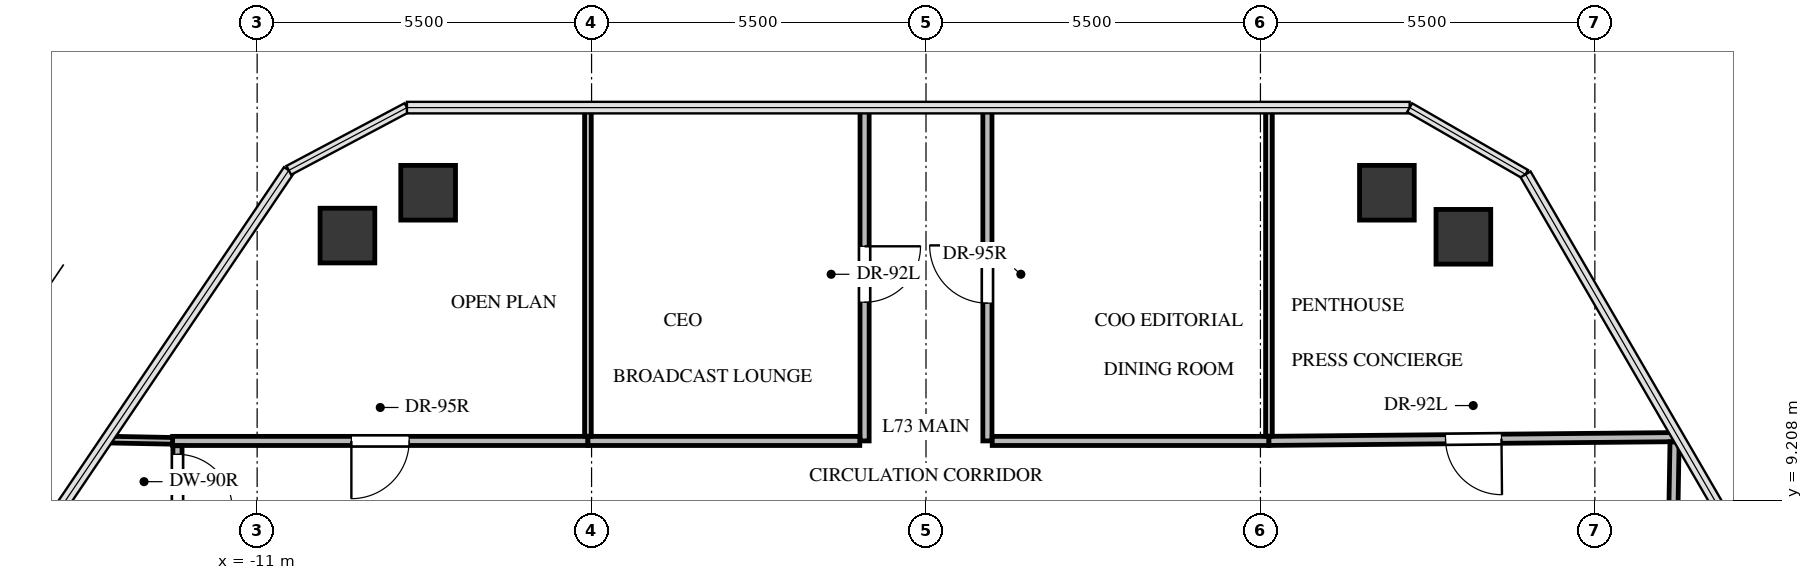
"""IFC4 building model, lengths in metres.
Left out: names, types, materials, properties, quantities, classifications, styles, units other than length and angle.
Written with IfcOpenShell. Run it as: python <this file> out.ifc"""

import sys

from ifc_helpers import new_model, si_unit, direction, frame, frame_2d, origin, origin_2d, place, context, subcontext, project, spatial, rectangle, extrude, source, transform, mapped, element, fill, save


model = new_model("IFC4")
c1 = context("Model", 3, precision=1e-05, world=origin(), true_north=direction((0.0, 1.0)))
c2 = subcontext(c1, "Body", "Model", "MODEL_VIEW")
j1 = project(units=[si_unit("LENGTHUNIT", "METRE"), si_unit("PLANEANGLEUNIT", "RADIAN")], contexts=[c1])
p1 = place(None, origin())
s1 = spatial("IfcSite", under=j1, at=p1, CompositionType="ELEMENT")
p2 = place(p1, origin())
s2 = spatial("IfcBuilding", under=s1, at=p2, CompositionType="ELEMENT")
p3 = place(p2, frame((0.0, 0.0, 261.5)))
s3 = spatial("IfcBuildingStorey", under=s2, at=p3, CompositionType="ELEMENT", Elevation=261.5)
m1 = source(origin(), c2, "Body", "SweptSolid", [
    extrude(rectangle(XDim=0.9, YDim=0.9, at=origin_2d()), origin(), (0.0, 0.0, 1.0), 3.34),
])
for number, where, z_axis, x_axis in (
    (1, (-9.515, 13.557, -0.24), (0.0, 0.0, 1.0), (1.0, 0.0, 0.0)),
    (2, (-8.188, 14.262, -0.24), (0.0, 0.0, 1.0), (1.0, 0.0, 0.0)),
    (3, (7.58, 14.262, -0.24), (0.0, 0.0, 1.0), (1.0, 0.0, 0.0)),
    (4, (8.837, 13.538, -0.24), (0.0, 0.0, 1.0), (1.0, 0.0, 0.0)),
):
    element("IfcColumn", number, at=place(p3, frame(where, z_axis=z_axis, x_axis=x_axis)), inside=s3, PredefinedType="COLUMN", context=c2, shape_type="MappedRepresentation", body=[
        mapped(m1, transform((0.0, 0.0, 0.0), x_axis=(1.0, 0.0, 0.0), y_axis=(0.0, 1.0, 0.0), z_axis=(0.0, 0.0, 1.0), scale=1.0)),
    ])
p4 = place(p3, frame((-5.56, 10.18, 0.0), z_axis=(0.0, 0.0, 1.0), x_axis=(-1.0, 0.0, 0.0)))
e5 = element("IfcWall", 5, at=p4, inside=s3, PredefinedType="PARTITIONING", context=c2, shape_type="SweptSolid", body=[
    extrude(rectangle(XDim=6.83, YDim=0.15, at=frame_2d((3.415, 0.0))), origin(), (0.0, 0.0, 1.0), 2.341),
])
p5 = place(p4, frame((2.94, 0.0, 0.0)))
e6 = element("IfcOpeningElement", 6, at=p5, cuts=e5, PredefinedType="OPENING", context=c2, shape_type="SweptSolid", body=[
    extrude(rectangle(XDim=0.95, YDim=2.1, at=frame_2d((0.475, 1.05))), frame((0.0, 0.085, 0.0), z_axis=(0.0, -1.0, 0.0), x_axis=(1.0, 0.0, 0.0)), (0.0, 0.0, 1.0), 0.17),
])
p6 = place(p3, frame((-1.01, 15.662, 0.0), z_axis=(0.0, 0.0, 1.0), x_axis=(0.0, -1.0, 0.0)))
e7 = element("IfcWall", 7, at=p6, inside=s3, PredefinedType="PARTITIONING", context=c2, shape_type="SweptSolid", body=[
    extrude(rectangle(XDim=5.482, YDim=0.15, at=frame_2d((2.741, 0.0))), origin(), (0.0, 0.0, 1.0), 2.439),
])
p7 = place(p6, frame((2.281, 0.0, 0.0)))
e8 = element("IfcOpeningElement", 8, at=p7, cuts=e7, PredefinedType="OPENING", context=c2, shape_type="SweptSolid", body=[
    extrude(rectangle(XDim=0.92, YDim=2.1, at=frame_2d((0.46, 1.05))), frame((0.0, 0.085, 0.0), z_axis=(0.0, -1.0, 0.0), x_axis=(1.0, 0.0, 0.0)), (0.0, 0.0, 1.0), 0.17),
])
p8 = place(p3, frame((-1.089, 10.18, 0.0), z_axis=(0.0, 0.0, 1.0), x_axis=(-1.0, 0.0, 0.0)))
e9 = element("IfcWall", 9, at=p8, inside=s3, PredefinedType="PARTITIONING", context=c2, shape_type="SweptSolid", body=[
    extrude(rectangle(XDim=4.471, YDim=0.15, at=frame_2d((2.235, 0.0))), origin(), (0.0, 0.0, 1.0), 2.648),
])
p9 = place(p3, frame((1.01, 10.18, 0.0), z_axis=(0.0, 0.0, 1.0), x_axis=(0.0, 1.0, 0.0)))
e10 = element("IfcWall", 10, at=p9, inside=s3, PredefinedType="PARTITIONING", context=c2, shape_type="SweptSolid", body=[
    extrude(rectangle(XDim=5.482, YDim=0.15, at=frame_2d((2.741, 0.0))), origin(), (0.0, 0.0, 1.0), 2.439),
])
p10 = place(p9, frame((2.266, 0.0, 0.0)))
e11 = element("IfcOpeningElement", 11, at=p10, cuts=e10, PredefinedType="OPENING", context=c2, shape_type="SweptSolid", body=[
    extrude(rectangle(XDim=0.95, YDim=2.1, at=frame_2d((0.475, 1.05))), frame((0.0, 0.085, 0.0), z_axis=(0.0, -1.0, 0.0), x_axis=(1.0, 0.0, 0.0)), (0.0, 0.0, 1.0), 0.17),
])
p11 = place(p3, frame((5.64, 10.18, 0.0), z_axis=(0.0, 0.0, 1.0), x_axis=(-1.0, 0.0, 0.0)))
e12 = element("IfcWall", 12, at=p11, inside=s3, PredefinedType="PARTITIONING", context=c2, shape_type="SweptSolid", body=[
    extrude(rectangle(XDim=4.551, YDim=0.15, at=frame_2d((2.275, 0.0))), origin(), (0.0, 0.0, 1.0), 2.648),
])
p12 = place(p3, frame((12.368, 10.243, 0.0), z_axis=(0.0, 0.0, 1.0), x_axis=(-0.999957198001, -0.009252143886, 0.0)))
e13 = element("IfcWall", 13, at=p12, inside=s3, PredefinedType="PARTITIONING", context=c2, shape_type="SweptSolid", body=[
    extrude(rectangle(XDim=6.729, YDim=0.15, at=frame_2d((3.364, 0.0))), origin(), (0.0, 0.0, 1.0), 2.341),
])
p13 = place(p12, frame((2.904, 0.0, 0.0)))
e14 = element("IfcOpeningElement", 14, at=p13, cuts=e13, PredefinedType="OPENING", context=c2, shape_type="SweptSolid", body=[
    extrude(rectangle(XDim=0.92, YDim=2.1, at=frame_2d((0.46, 1.05))), frame((0.0, 0.085, 0.0), z_axis=(0.0, -1.0, 0.0), x_axis=(1.0, 0.0, 0.0)), (0.0, 0.0, 1.0), 0.17),
])
p14 = place(p3, frame((-12.31, 10.101, 0.0), z_axis=(0.0, 0.0, 1.0), x_axis=(0.0, -1.0, 0.0)))
e15 = element("IfcWall", 15, at=p14, inside=s3, PredefinedType="PARTITIONING", context=c2, shape_type="SweptSolid", body=[
    extrude(rectangle(XDim=1.182, YDim=0.15, at=frame_2d((0.591, 0.0))), origin(), (0.0, 0.0, 1.0), 2.439),
])
p15 = place(p14, frame((0.141, 0.0, 0.0)))
e16 = element("IfcOpeningElement", 16, at=p15, cuts=e15, PredefinedType="OPENING", context=c2, shape_type="SweptSolid", body=[
    extrude(rectangle(XDim=0.9, YDim=2.05, at=frame_2d((0.45, 1.025))), frame((0.0, 0.085, 0.0), z_axis=(0.0, -1.0, 0.0), x_axis=(1.0, 0.0, 0.0)), (0.0, 0.0, 1.0), 0.17),
])
p16 = place(p3, frame((12.181, 2.49, 0.0), z_axis=(0.0, 0.0, 1.0), x_axis=(0.016828669653, 0.999858387912, 0.0)))
e17 = element("IfcWall", 17, at=p16, inside=s3, PredefinedType="PARTITIONING", context=c2, shape_type="SweptSolid", body=[
    extrude(rectangle(XDim=7.674, YDim=0.15, at=frame_2d((3.837, 0.0))), origin(), (0.0, 0.0, 1.0), 2.439),
])
p17 = place(p16, frame((3.377, 0.0, 0.0)))
e18 = element("IfcOpeningElement", 18, at=p17, cuts=e17, PredefinedType="OPENING", context=c2, shape_type="SweptSolid", body=[
    extrude(rectangle(XDim=0.92, YDim=2.1, at=frame_2d((0.46, 1.05))), frame((0.0, 0.085, 0.0), z_axis=(0.0, -1.0, 0.0), x_axis=(1.0, 0.0, 0.0)), (0.0, 0.0, 1.0), 0.17),
])
p18 = place(p3, frame((-5.56, 15.662, 0.0), z_axis=(0.0, 0.0, 1.0), x_axis=(0.0, -1.0, 0.0)))
e19 = element("IfcWall", 19, at=p18, inside=s3, PredefinedType="MOVABLE", context=c2, shape_type="SweptSolid", body=[
    extrude(rectangle(XDim=5.403, YDim=0.11, at=frame_2d((2.702, 0.0))), origin(), (0.0, 0.0, 1.0), 2.439),
])
p19 = place(p3, frame((-12.39, 10.181, 0.0), z_axis=(0.0, 0.0, 1.0), x_axis=(-0.999812128272, 0.019383192748, 0.0)))
e20 = element("IfcWall", 20, at=p19, inside=s3, PredefinedType="MOVABLE", context=c2, shape_type="SweptSolid", body=[
    extrude(rectangle(XDim=1.083, YDim=0.11, at=frame_2d((0.542, 0.0))), origin(), (0.0, 0.0, 1.0), 3.085),
])
p20 = place(p3, frame((5.64, 15.662, 0.0), z_axis=(0.0, 0.0, 1.0), x_axis=(0.0, -1.0, 0.0)))
e21 = element("IfcWall", 21, at=p20, inside=s3, PredefinedType="MOVABLE", context=c2, shape_type="SweptSolid", body=[
    extrude(rectangle(XDim=5.402, YDim=0.11, at=frame_2d((2.701, 0.0))), origin(), (0.0, 0.0, 1.0), 2.439),
])
m2 = source(origin(), c2, "Body", "SweptSolid", [
    extrude(rectangle(XDim=0.95, YDim=2.1, at=frame_2d((0.475, 1.05))), frame((0.0, 0.025, 0.0), z_axis=(0.0, -1.0, 0.0), x_axis=(1.0, 0.0, 0.0)), (0.0, 0.0, 1.0), 0.05),
])
p21 = place(p5, origin())
e22 = element("IfcDoor", 22, at=p21, inside=s3, OperationType="SINGLE_SWING_RIGHT", PredefinedType="DOOR", context=c2, shape_type="MappedRepresentation", body=[
    mapped(m2, transform((0.0, 0.0, 0.0), x_axis=(1.0, 0.0, 0.0), y_axis=(0.0, 1.0, 0.0), z_axis=(0.0, 0.0, 1.0), scale=1.0)),
])
fill(e6, e22)
m3 = source(origin(), c2, "Body", "SweptSolid", [
    extrude(rectangle(XDim=0.92, YDim=2.1, at=frame_2d((0.46, 1.05))), frame((0.0, 0.025, 0.0), z_axis=(0.0, -1.0, 0.0), x_axis=(1.0, 0.0, 0.0)), (0.0, 0.0, 1.0), 0.05),
])
p22 = place(p7, origin())
e23 = element("IfcDoor", 23, at=p22, inside=s3, OperationType="SINGLE_SWING_LEFT", PredefinedType="DOOR", context=c2, shape_type="MappedRepresentation", body=[
    mapped(m3, transform((0.0, 0.0, 0.0), x_axis=(1.0, 0.0, 0.0), y_axis=(0.0, 1.0, 0.0), z_axis=(0.0, 0.0, 1.0), scale=1.0)),
])
fill(e8, e23)
p23 = place(p10, origin())
e24 = element("IfcDoor", 24, at=p23, inside=s3, OperationType="SINGLE_SWING_RIGHT", PredefinedType="DOOR", context=c2, shape_type="MappedRepresentation", body=[
    mapped(m2, transform((0.0, 0.0, 0.0), x_axis=(1.0, 0.0, 0.0), y_axis=(0.0, 1.0, 0.0), z_axis=(0.0, 0.0, 1.0), scale=1.0)),
])
fill(e11, e24)
p24 = place(p13, origin())
e25 = element("IfcDoor", 25, at=p24, inside=s3, OperationType="SINGLE_SWING_LEFT", PredefinedType="DOOR", context=c2, shape_type="MappedRepresentation", body=[
    mapped(m3, transform((0.0, 0.0, 0.0), x_axis=(1.0, 0.0, 0.0), y_axis=(0.0, 1.0, 0.0), z_axis=(0.0, 0.0, 1.0), scale=1.0)),
])
fill(e14, e25)
m4 = source(origin(), c2, "Body", "SweptSolid", [
    extrude(rectangle(XDim=0.9, YDim=2.05, at=frame_2d((0.45, 1.025))), frame((0.0, 0.025, 0.0), z_axis=(0.0, -1.0, 0.0), x_axis=(1.0, 0.0, 0.0)), (0.0, 0.0, 1.0), 0.05),
])
p25 = place(p15, origin())
e26 = element("IfcDoor", 26, at=p25, inside=s3, OperationType="SINGLE_SWING_RIGHT", PredefinedType="DOOR", context=c2, shape_type="MappedRepresentation", body=[
    mapped(m4, transform((0.0, 0.0, 0.0), x_axis=(1.0, 0.0, 0.0), y_axis=(0.0, 1.0, 0.0), z_axis=(0.0, 0.0, 1.0), scale=1.0)),
])
fill(e16, e26)
save(model, sys.argv[1])
